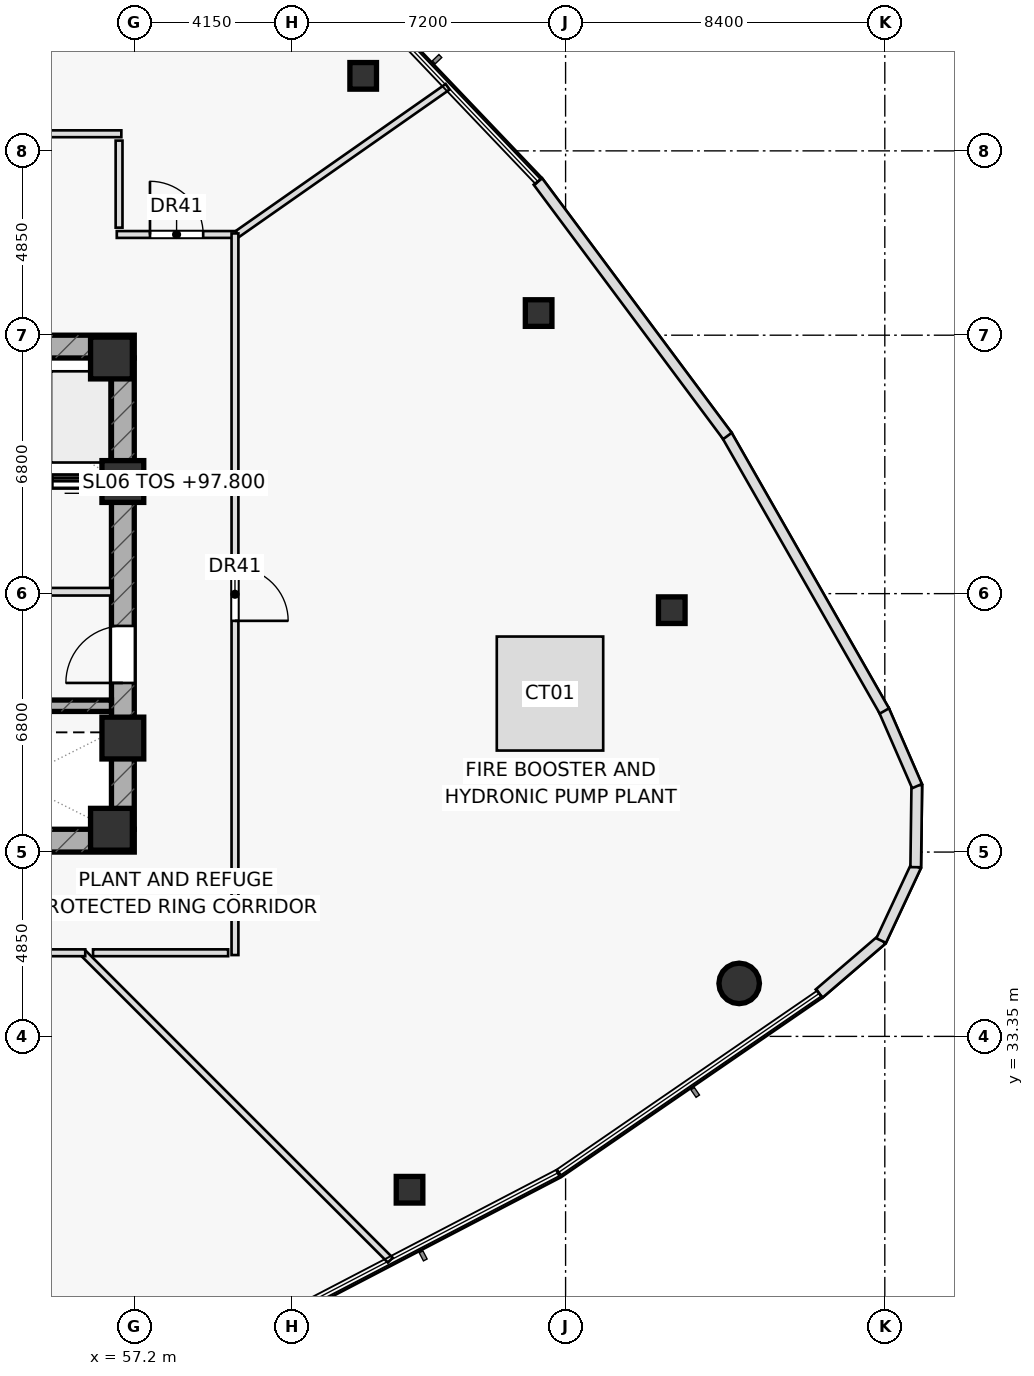
"""IFC4 building model, lengths in metres.
Left out: names, types, materials, properties, quantities, classifications, styles, units other than length and angle.
Written with IfcOpenShell. Run it as: python <this file> out.ifc"""

import sys

from ifc_helpers import new_model, si_unit, direction, frame, frame_2d, origin, origin_2d, place, context, subcontext, project, spatial, rectangle, hollow_rectangle, hollow_circle, extrude, element, fill, save


model = new_model("IFC4")
c1 = context("Model", 3, precision=1e-05, world=origin(), true_north=direction((0.0, 1.0)))
c2 = subcontext(c1, "Body", "Model", "MODEL_VIEW")
j1 = project(units=[si_unit("LENGTHUNIT", "METRE"), si_unit("PLANEANGLEUNIT", "RADIAN")], contexts=[c1])
p1 = place(None, origin())
s1 = spatial("IfcSite", under=j1, at=p1, CompositionType="ELEMENT")
p2 = place(p1, origin())
s2 = spatial("IfcBuilding", under=s1, at=p2, CompositionType="ELEMENT")
p3 = place(p2, frame((0.0, 0.0, 97.8)))
s3 = spatial("IfcBuildingStorey", under=s2, at=p3, CompositionType="ELEMENT", Elevation=97.8)
p4 = place(p3, frame((42.8, 51.5, 0.0), z_axis=(0.0, 0.0, 1.0), x_axis=(1.0, 0.0, 0.0)))
e1 = element("IfcWall", 1, at=p4, inside=s3, PredefinedType="SHEAR", context=c2, shape_type="SweptSolid", body=[
    extrude(rectangle(XDim=14.4, YDim=0.6, at=frame_2d((7.2, 0.0))), origin(), (0.0, 0.0, 1.0), 4.55),
])
p5 = place(p4, frame((0.88, 0.0, 0.0)))
e2 = element("IfcOpeningElement", 2, at=p5, cuts=e1, PredefinedType="OPENING", context=c2, shape_type="SweptSolid", body=[
    extrude(rectangle(XDim=1.05, YDim=2.2, at=frame_2d((0.525, 1.1))), frame((0.0, 0.31, 0.0), z_axis=(0.0, -1.0, 0.0), x_axis=(1.0, 0.0, 0.0)), (0.0, 0.0, 1.0), 0.62),
])
p6 = place(p3, frame((42.8, 38.5, 0.0), z_axis=(0.0, 0.0, 1.0), x_axis=(1.0, 0.0, 0.0)))
e3 = element("IfcWall", 3, at=p6, inside=s3, PredefinedType="SHEAR", context=c2, shape_type="SweptSolid", body=[
    extrude(rectangle(XDim=14.4, YDim=0.6, at=frame_2d((7.2, 0.0))), origin(), (0.0, 0.0, 1.0), 4.55),
])
p7 = place(p6, frame((0.88, 0.0, 0.0)))
e4 = element("IfcOpeningElement", 4, at=p7, cuts=e3, PredefinedType="OPENING", context=c2, shape_type="SweptSolid", body=[
    extrude(rectangle(XDim=1.05, YDim=2.2, at=frame_2d((0.525, 1.1))), frame((0.0, 0.31, 0.0), z_axis=(0.0, -1.0, 0.0), x_axis=(1.0, 0.0, 0.0)), (0.0, 0.0, 1.0), 0.62),
])
p8 = place(p3, frame((56.9, 38.8, 0.0), z_axis=(0.0, 0.0, 1.0), x_axis=(0.0, 1.0, 0.0)))
e5 = element("IfcWall", 5, at=p8, inside=s3, PredefinedType="SHEAR", context=c2, shape_type="SweptSolid", body=[
    extrude(rectangle(XDim=12.4, YDim=0.6, at=frame_2d((6.2, 0.0))), origin(), (0.0, 0.0, 1.0), 4.55),
])
p9 = place(p8, frame((3.85, 0.0, 0.0)))
e6 = element("IfcOpeningElement", 6, at=p9, cuts=e5, PredefinedType="OPENING", context=c2, shape_type="SweptSolid", body=[
    extrude(rectangle(XDim=1.5, YDim=2.2, at=frame_2d((0.75, 1.1))), frame((0.0, 0.31, 0.0), z_axis=(0.0, -1.0, 0.0), x_axis=(1.0, 0.0, 0.0)), (0.0, 0.0, 1.0), 0.62),
])
p10 = place(p3, frame((43.4, 47.95, 0.0), z_axis=(0.0, 0.0, 1.0), x_axis=(1.0, 0.0, 0.0)))
e7 = element("IfcWall", 7, at=p10, inside=s3, PredefinedType="SHEAR", context=c2, shape_type="SweptSolid", body=[
    extrude(rectangle(XDim=13.2, YDim=0.3, at=frame_2d((6.6, 0.0))), origin(), (0.0, 0.0, 1.0), 4.55),
])
p11 = place(p10, frame((8.345, 0.0, 0.0)))
e8 = element("IfcOpeningElement", 8, at=p11, cuts=e7, PredefinedType="OPENING", context=c2, shape_type="SweptSolid", body=[
    extrude(rectangle(XDim=1.15, YDim=2.2, at=frame_2d((0.575, 1.1))), frame((0.0, 0.16, 0.0), z_axis=(0.0, -1.0, 0.0), x_axis=(1.0, 0.0, 0.0)), (0.0, 0.0, 1.0), 0.32),
])
p12 = place(p10, frame((10.065, 0.0, 0.0)))
e9 = element("IfcOpeningElement", 9, at=p12, cuts=e7, PredefinedType="OPENING", context=c2, shape_type="SweptSolid", body=[
    extrude(rectangle(XDim=1.15, YDim=2.2, at=frame_2d((0.575, 1.1))), frame((0.0, 0.16, 0.0), z_axis=(0.0, -1.0, 0.0), x_axis=(1.0, 0.0, 0.0)), (0.0, 0.0, 1.0), 0.32),
])
p13 = place(p10, frame((11.645, 0.0, 0.0)))
e10 = element("IfcOpeningElement", 10, at=p13, cuts=e7, PredefinedType="OPENING", context=c2, shape_type="SweptSolid", body=[
    extrude(rectangle(XDim=1.15, YDim=2.2, at=frame_2d((0.575, 1.1))), frame((0.0, 0.16, 0.0), z_axis=(0.0, -1.0, 0.0), x_axis=(1.0, 0.0, 0.0)), (0.0, 0.0, 1.0), 0.32),
])
p14 = place(p3, frame((43.4, 42.05, 0.0), z_axis=(0.0, 0.0, 1.0), x_axis=(1.0, 0.0, 0.0)))
e11 = element("IfcWall", 11, at=p14, inside=s3, PredefinedType="SHEAR", context=c2, shape_type="SweptSolid", body=[
    extrude(rectangle(XDim=13.2, YDim=0.3, at=frame_2d((6.6, 0.0))), origin(), (0.0, 0.0, 1.0), 4.55),
])
for number, where, z_axis, x_axis in (
    (12, (56.9, 47.95, 0.0), (0.0, 0.0, 1.0), (1.0, 0.0, 0.0)),
    (13, (56.6, 51.2, 0.0), (0.0, 0.0, 1.0), (1.0, 0.0, 0.0)),
    (14, (56.9, 41.2, 0.0), (0.0, 0.0, 1.0), (1.0, 0.0, 0.0)),
    (15, (56.6, 38.8, 0.0), (0.0, 0.0, 1.0), (1.0, 0.0, 0.0)),
):
    element("IfcColumn", number, at=place(p3, frame(where, z_axis=z_axis, x_axis=x_axis)), inside=s3, PredefinedType="COLUMN", context=c2, shape_type="SweptSolid", body=[
        extrude(rectangle(XDim=1.1, YDim=1.1, at=origin_2d()), origin(), (0.0, 0.0, 1.0), 4.55),
    ])
p15 = place(p3, frame((64.444, 29.315, 0.0), z_axis=(0.0, 0.0, 1.0), x_axis=(1.0, 0.0, 0.0)))
e16 = element("IfcColumn", 16, at=p15, inside=s3, PredefinedType="COLUMN", context=c2, shape_type="SweptSolid", body=[
    extrude(hollow_rectangle(XDim=0.7, YDim=0.7, WallThickness=0.04, at=origin_2d()), origin(), (0.0, 0.0, 1.0), 4.55),
])
p16 = place(p3, frame((73.118, 34.744, 0.0), z_axis=(0.0, 0.0, 1.0), x_axis=(1.0, 0.0, 0.0)))
e17 = element("IfcColumn", 17, at=p16, inside=s3, PredefinedType="COLUMN", context=c2, shape_type="SweptSolid", body=[
    extrude(hollow_circle(Radius=0.533, WallThickness=0.045, at=origin_2d()), origin(), (0.0, 0.0, 1.0), 4.55),
])
for number, where, z_axis, x_axis in (
    (18, (71.344, 44.565, 0.0), (0.0, 0.0, 1.0), (1.0, 0.0, 0.0)),
    (19, (67.841, 52.383, 0.0), (0.0, 0.0, 1.0), (1.0, 0.0, 0.0)),
    (20, (63.224, 58.624, 0.0), (0.0, 0.0, 1.0), (1.0, 0.0, 0.0)),
):
    element("IfcColumn", number, at=place(p3, frame(where, z_axis=z_axis, x_axis=x_axis)), inside=s3, PredefinedType="COLUMN", context=c2, shape_type="SweptSolid", body=[
        extrude(hollow_rectangle(XDim=0.7, YDim=0.7, WallThickness=0.04, at=origin_2d()), origin(), (0.0, 0.0, 1.0), 4.55),
    ])
p17 = place(p3, frame((50.65, 45.05, 0.0), z_axis=(0.0, 0.0, 1.0), x_axis=(1.0, 0.0, 0.0)))
e21 = element("IfcWall", 21, at=p17, inside=s3, PredefinedType="PARTITIONING", context=c2, shape_type="SweptSolid", body=[
    extrude(rectangle(XDim=5.95, YDim=0.2, at=frame_2d((2.975, 0.0))), origin(), (0.0, 0.0, 1.0), 4.55),
])
p18 = place(p17, frame((1.35, 0.0, 0.0)))
e22 = element("IfcOpeningElement", 22, at=p18, cuts=e21, PredefinedType="OPENING", context=c2, shape_type="SweptSolid", body=[
    extrude(rectangle(XDim=1.5, YDim=2.2, at=frame_2d((0.75, 1.1))), frame((0.0, 0.11, 0.0), z_axis=(0.0, -1.0, 0.0), x_axis=(1.0, 0.0, 0.0)), (0.0, 0.0, 1.0), 0.22),
])
p19 = place(p3, frame((59.85, 54.418, 0.0), z_axis=(0.0, 0.0, 1.0), x_axis=(0.819142926279, 0.573589457998, 0.0)))
e23 = element("IfcWall", 23, at=p19, inside=s3, PredefinedType="PARTITIONING", context=c2, shape_type="SweptSolid", body=[
    extrude(rectangle(XDim=6.832, YDim=0.18, at=frame_2d((3.416, 0.0))), origin(), (0.0, 0.0, 1.0), 3.975),
])
p20 = place(p3, frame((55.85, 35.55, 0.0), z_axis=(0.0, 0.0, 1.0), x_axis=(0.707096109246, -0.707117452966, 0.0)))
e24 = element("IfcWall", 24, at=p20, inside=s3, PredefinedType="PARTITIONING", context=c2, shape_type="SweptSolid", body=[
    extrude(rectangle(XDim=11.438, YDim=0.18, at=frame_2d((5.719, 0.0))), origin(), (0.0, 0.0, 1.0), 3.925),
])
p21 = place(p3, frame((56.74, 54.45, 0.0), z_axis=(0.0, 0.0, 1.0), x_axis=(1.0, 0.0, 0.0)))
e25 = element("IfcWall", 25, at=p21, inside=s3, PredefinedType="PARTITIONING", context=c2, shape_type="SweptSolid", body=[
    extrude(rectangle(XDim=3.147, YDim=0.18, at=frame_2d((1.574, 0.0))), origin(), (0.0, 0.0, 1.0), 3.925),
])
p22 = place(p21, frame((0.874, 0.0, 0.0)))
e26 = element("IfcOpeningElement", 26, at=p22, cuts=e25, PredefinedType="OPENING", context=c2, shape_type="SweptSolid", body=[
    extrude(rectangle(XDim=1.4, YDim=2.15, at=frame_2d((0.7, 1.075))), frame((0.0, 0.1, 0.0), z_axis=(0.0, -1.0, 0.0), x_axis=(1.0, 0.0, 0.0)), (0.0, 0.0, 1.0), 0.2),
])
p23 = place(p3, frame((59.85, 54.478, 0.0), z_axis=(0.0, 0.0, 1.0), x_axis=(0.0, -1.0, 0.0)))
e27 = element("IfcWall", 27, at=p23, inside=s3, PredefinedType="PARTITIONING", context=c2, shape_type="SweptSolid", body=[
    extrude(rectangle(XDim=18.988, YDim=0.18, at=frame_2d((9.494, 0.0))), origin(), (0.0, 0.0, 1.0), 3.925),
])
p24 = place(p23, frame((8.794, 0.0, 0.0)))
e28 = element("IfcOpeningElement", 28, at=p24, cuts=e27, PredefinedType="OPENING", context=c2, shape_type="SweptSolid", body=[
    extrude(rectangle(XDim=1.4, YDim=2.15, at=frame_2d((0.7, 1.075))), frame((0.0, 0.1, 0.0), z_axis=(0.0, -1.0, 0.0), x_axis=(1.0, 0.0, 0.0)), (0.0, 0.0, 1.0), 0.2),
])
p25 = place(p3, frame((59.67, 35.55, 0.0), z_axis=(0.0, 0.0, 1.0), x_axis=(-1.0, 0.0, 0.0)))
e29 = element("IfcWall", 29, at=p25, inside=s3, PredefinedType="PARTITIONING", context=c2, shape_type="SweptSolid", body=[
    extrude(rectangle(XDim=3.555, YDim=0.18, at=frame_2d((1.777, 0.0))), origin(), (0.0, 0.0, 1.0), 3.925),
])
p26 = place(p3, frame((55.91, 35.55, 0.0), z_axis=(0.0, 0.0, 1.0), x_axis=(-1.0, 0.0, 0.0)))
e30 = element("IfcWall", 30, at=p26, inside=s3, PredefinedType="PARTITIONING", context=c2, shape_type="SweptSolid", body=[
    extrude(rectangle(XDim=9.92, YDim=0.18, at=frame_2d((4.96, 0.0))), origin(), (0.0, 0.0, 1.0), 4.55),
])
p27 = place(p26, frame((4.26, 0.0, 0.0)))
e31 = element("IfcOpeningElement", 31, at=p27, cuts=e30, PredefinedType="OPENING", context=c2, shape_type="SweptSolid", body=[
    extrude(rectangle(XDim=1.4, YDim=2.15, at=frame_2d((0.7, 1.075))), frame((0.0, 0.1, 0.0), z_axis=(0.0, -1.0, 0.0), x_axis=(1.0, 0.0, 0.0)), (0.0, 0.0, 1.0), 0.2),
])
p28 = place(p3, frame((43.08, 57.1, 0.0), z_axis=(0.0, 0.0, 1.0), x_axis=(1.0, 0.0, 0.0)))
e32 = element("IfcWall", 32, at=p28, inside=s3, PredefinedType="PARTITIONING", context=c2, shape_type="SweptSolid", body=[
    extrude(rectangle(XDim=13.78, YDim=0.18, at=frame_2d((6.89, 0.0))), origin(), (0.0, 0.0, 1.0), 3.925),
])
p29 = place(p3, frame((56.8, 56.92, 0.0), z_axis=(0.0, 0.0, 1.0), x_axis=(0.0, -1.0, 0.0)))
e33 = element("IfcWall", 33, at=p29, inside=s3, PredefinedType="PARTITIONING", context=c2, shape_type="SweptSolid", body=[
    extrude(rectangle(XDim=2.29, YDim=0.18, at=frame_2d((1.145, 0.0))), origin(), (0.0, 0.0, 1.0), 3.925),
])
p30 = place(p3, frame((75.222, 34.478, 0.0), z_axis=(0.0, 0.0, 1.0), x_axis=(0.758637998703, 0.651512384321, 0.0)))
e34 = element("IfcWall", 34, at=p30, inside=s3, PredefinedType="STANDARD", context=c2, shape_type="SweptSolid", body=[
    extrude(rectangle(XDim=2.174, YDim=0.28, at=frame_2d((1.087, 0.0))), origin(), (0.0, 0.0, 1.0), 4.55),
])
p31 = place(p3, frame((76.854, 35.871, 0.0), z_axis=(0.0, 0.0, 1.0), x_axis=(0.423441583962, 0.905923410103, 0.0)))
e35 = element("IfcWall", 35, at=p31, inside=s3, PredefinedType="STANDARD", context=c2, shape_type="SweptSolid", body=[
    extrude(rectangle(XDim=2.163, YDim=0.28, at=frame_2d((1.081, 0.0))), origin(), (0.0, 0.0, 1.0), 4.55),
])
p32 = place(p3, frame((77.763, 37.802, 0.0), z_axis=(0.0, 0.0, 1.0), x_axis=(0.013094384142, 0.999914264877, 0.0)))
e36 = element("IfcWall", 36, at=p32, inside=s3, PredefinedType="STANDARD", context=c2, shape_type="SweptSolid", body=[
    extrude(rectangle(XDim=2.163, YDim=0.28, at=frame_2d((1.082, 0.0))), origin(), (0.0, 0.0, 1.0), 4.55),
])
p33 = place(p3, frame((77.797, 39.936, 0.0), z_axis=(0.0, 0.0, 1.0), x_axis=(-0.399534865094, 0.916718000027, 0.0)))
e37 = element("IfcWall", 37, at=p33, inside=s3, PredefinedType="STANDARD", context=c2, shape_type="SweptSolid", body=[
    extrude(rectangle(XDim=2.185, YDim=0.28, at=frame_2d((1.093, 0.0))), origin(), (0.0, 0.0, 1.0), 4.55),
])
p34 = place(p3, frame((76.938, 41.912, 0.0), z_axis=(0.0, 0.0, 1.0), x_axis=(-0.495824438924, 0.868422780543, 0.0)))
e38 = element("IfcWall", 38, at=p34, inside=s3, PredefinedType="STANDARD", context=c2, shape_type="SweptSolid", body=[
    extrude(rectangle(XDim=8.361, YDim=0.28, at=frame_2d((4.18, 0.0))), origin(), (0.0, 0.0, 1.0), 4.55),
])
p35 = place(p3, frame((72.809, 49.148, 0.0), z_axis=(0.0, 0.0, 1.0), x_axis=(-0.5972781529, 0.802034168891, 0.0)))
e39 = element("IfcWall", 39, at=p35, inside=s3, PredefinedType="STANDARD", context=c2, shape_type="SweptSolid", body=[
    extrude(rectangle(XDim=8.349, YDim=0.28, at=frame_2d((4.174, 0.0))), origin(), (0.0, 0.0, 1.0), 4.55),
])
p36 = place(p9, origin())
e40 = element("IfcDoor", 40, at=p36, inside=s3, OperationType="SINGLE_SWING_LEFT", PredefinedType="DOOR", context=c2, shape_type="SweptSolid", body=[
    extrude(rectangle(XDim=1.5, YDim=2.2, at=frame_2d((0.75, 1.1))), frame((0.0, 0.025, 0.0), z_axis=(0.0, -1.0, 0.0), x_axis=(1.0, 0.0, 0.0)), (0.0, 0.0, 1.0), 0.05),
])
fill(e6, e40)
p37 = place(p22, origin())
e41 = element("IfcDoor", 41, at=p37, inside=s3, OperationType="SINGLE_SWING_LEFT", PredefinedType="DOOR", context=c2, shape_type="SweptSolid", body=[
    extrude(rectangle(XDim=1.4, YDim=2.15, at=frame_2d((0.7, 1.075))), frame((0.0, 0.025, 0.0), z_axis=(0.0, -1.0, 0.0), x_axis=(1.0, 0.0, 0.0)), (0.0, 0.0, 1.0), 0.05),
])
fill(e26, e41)
p38 = place(p24, origin())
e42 = element("IfcDoor", 42, at=p38, inside=s3, OperationType="SINGLE_SWING_RIGHT", PredefinedType="DOOR", context=c2, shape_type="SweptSolid", body=[
    extrude(rectangle(XDim=1.4, YDim=2.15, at=frame_2d((0.7, 1.075))), frame((0.0, 0.025, 0.0), z_axis=(0.0, -1.0, 0.0), x_axis=(1.0, 0.0, 0.0)), (0.0, 0.0, 1.0), 0.05),
])
fill(e28, e42)
p39 = place(p13, origin())
e43 = element("IfcDoor", 43, at=p39, inside=s3, OperationType="SLIDING_TO_LEFT", PredefinedType="DOOR", context=c2, shape_type="SweptSolid", body=[
    extrude(rectangle(XDim=1.15, YDim=2.2, at=frame_2d((0.575, 1.1))), frame((0.0, 0.025, 0.0), z_axis=(0.0, -1.0, 0.0), x_axis=(1.0, 0.0, 0.0)), (0.0, 0.0, 1.0), 0.05),
])
fill(e10, e43)
save(model, sys.argv[1])
